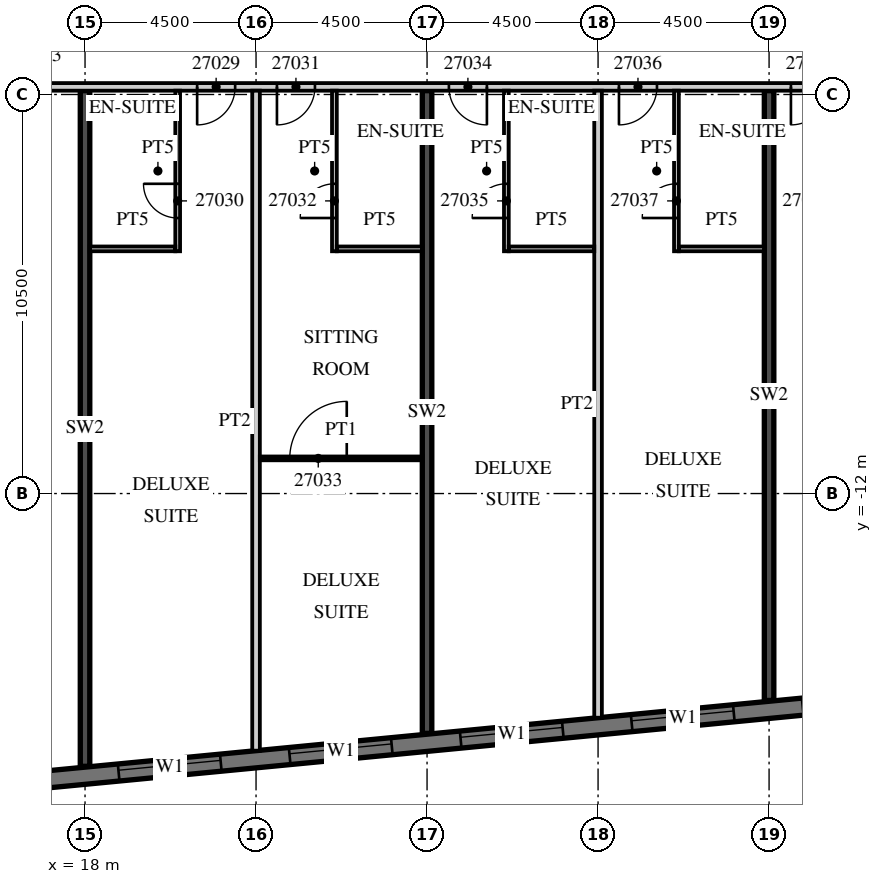
"""IFC4 building model, lengths in metres.
Left out: names, types, materials, properties, quantities, classifications, styles, units other than length and angle.
Written with IfcOpenShell. Run it as: python <this file> out.ifc"""

import sys

from ifc_helpers import new_model, si_unit, direction, frame, frame_2d, origin, place, context, subcontext, project, spatial, rectangle, extrude, element, fill, save


model = new_model("IFC4")
c1 = context("Model", 3, precision=1e-05, world=origin(), true_north=direction((0.0, 1.0)))
c2 = subcontext(c1, "Body", "Model", "MODEL_VIEW")
j1 = project(units=[si_unit("LENGTHUNIT", "METRE"), si_unit("PLANEANGLEUNIT", "RADIAN")], contexts=[c1])
p1 = place(None, origin())
s1 = spatial("IfcSite", under=j1, at=p1, CompositionType="ELEMENT")
p2 = place(p1, origin())
s2 = spatial("IfcBuilding", under=s1, at=p2, CompositionType="ELEMENT")
p3 = place(p2, frame((0.0, 0.0, 124.0)))
s3 = spatial("IfcBuildingStorey", under=s2, at=p3, CompositionType="ELEMENT", Elevation=124.0)
p4 = place(p3, frame((18.0, -19.177, 0.0), z_axis=(0.0, 0.0, 1.0), x_axis=(0.0, 1.0, 0.0)))
e1 = element("IfcWall", 1, at=p4, inside=s3, PredefinedType="SHEAR", context=c2, shape_type="SweptSolid", body=[
    extrude(rectangle(XDim=17.777, YDim=0.25, at=frame_2d((8.889, 0.0))), origin(), (0.0, 0.0, 1.0), 3.3),
])
p5 = place(p3, frame((27.0, -18.311, 0.0), z_axis=(0.0, 0.0, 1.0), x_axis=(0.0, 1.0, 0.0)))
e2 = element("IfcWall", 2, at=p5, inside=s3, PredefinedType="SHEAR", context=c2, shape_type="SweptSolid", body=[
    extrude(rectangle(XDim=16.911, YDim=0.25, at=frame_2d((8.455, 0.0))), origin(), (0.0, 0.0, 1.0), 3.3),
])
p6 = place(p3, frame((36.0, -17.444, 0.0), z_axis=(0.0, 0.0, 1.0), x_axis=(0.0, 1.0, 0.0)))
e3 = element("IfcWall", 3, at=p6, inside=s3, PredefinedType="SHEAR", context=c2, shape_type="SweptSolid", body=[
    extrude(rectangle(XDim=16.044, YDim=0.25, at=frame_2d((8.022, 0.0))), origin(), (0.0, 0.0, 1.0), 3.3),
])
p7 = place(p3, frame((-13.521, -22.46, 0.0), z_axis=(0.0, 0.0, 1.0), x_axis=(0.995396096335, 0.095846812164, 0.0)))
e4 = element("IfcWall", 4, at=p7, inside=s3, PredefinedType="SOLIDWALL", context=c2, shape_type="SweptSolid", body=[
    extrude(rectangle(XDim=59.151, YDim=0.45, at=frame_2d((29.575, 0.0))), origin(), (0.0, 0.0, 1.0), 3.02),
])
p8 = place(p7, frame((0.91, 0.0, 0.45)))
e5 = element("IfcOpeningElement", 5, at=p8, cuts=e4, PredefinedType="OPENING", context=c2, shape_type="SweptSolid", body=[
    extrude(rectangle(XDim=2.7, YDim=2.25, at=frame_2d((1.35, 1.125))), frame((0.0, 0.235, 0.0), z_axis=(0.0, -1.0, 0.0), x_axis=(1.0, 0.0, 0.0)), (0.0, 0.0, 1.0), 0.47),
])
p9 = place(p7, frame((5.431, 0.0, 0.45)))
e6 = element("IfcOpeningElement", 6, at=p9, cuts=e4, PredefinedType="OPENING", context=c2, shape_type="SweptSolid", body=[
    extrude(rectangle(XDim=2.7, YDim=2.25, at=frame_2d((1.35, 1.125))), frame((0.0, 0.235, 0.0), z_axis=(0.0, -1.0, 0.0), x_axis=(1.0, 0.0, 0.0)), (0.0, 0.0, 1.0), 0.47),
])
p10 = place(p7, frame((9.952, 0.0, 0.45)))
e7 = element("IfcOpeningElement", 7, at=p10, cuts=e4, PredefinedType="OPENING", context=c2, shape_type="SweptSolid", body=[
    extrude(rectangle(XDim=2.7, YDim=2.25, at=frame_2d((1.35, 1.125))), frame((0.0, 0.235, 0.0), z_axis=(0.0, -1.0, 0.0), x_axis=(1.0, 0.0, 0.0)), (0.0, 0.0, 1.0), 0.47),
])
p11 = place(p7, frame((14.473, 0.0, 0.45)))
e8 = element("IfcOpeningElement", 8, at=p11, cuts=e4, PredefinedType="OPENING", context=c2, shape_type="SweptSolid", body=[
    extrude(rectangle(XDim=2.7, YDim=2.25, at=frame_2d((1.35, 1.125))), frame((0.0, 0.235, 0.0), z_axis=(0.0, -1.0, 0.0), x_axis=(1.0, 0.0, 0.0)), (0.0, 0.0, 1.0), 0.47),
])
p12 = place(p7, frame((18.994, 0.0, 0.45)))
e9 = element("IfcOpeningElement", 9, at=p12, cuts=e4, PredefinedType="OPENING", context=c2, shape_type="SweptSolid", body=[
    extrude(rectangle(XDim=2.7, YDim=2.25, at=frame_2d((1.35, 1.125))), frame((0.0, 0.235, 0.0), z_axis=(0.0, -1.0, 0.0), x_axis=(1.0, 0.0, 0.0)), (0.0, 0.0, 1.0), 0.47),
])
p13 = place(p7, frame((23.514, 0.0, 0.45)))
e10 = element("IfcOpeningElement", 10, at=p13, cuts=e4, PredefinedType="OPENING", context=c2, shape_type="SweptSolid", body=[
    extrude(rectangle(XDim=2.7, YDim=2.25, at=frame_2d((1.35, 1.125))), frame((0.0, 0.235, 0.0), z_axis=(0.0, -1.0, 0.0), x_axis=(1.0, 0.0, 0.0)), (0.0, 0.0, 1.0), 0.47),
])
p14 = place(p7, frame((28.035, 0.0, 0.45)))
e11 = element("IfcOpeningElement", 11, at=p14, cuts=e4, PredefinedType="OPENING", context=c2, shape_type="SweptSolid", body=[
    extrude(rectangle(XDim=2.7, YDim=2.25, at=frame_2d((1.35, 1.125))), frame((0.0, 0.235, 0.0), z_axis=(0.0, -1.0, 0.0), x_axis=(1.0, 0.0, 0.0)), (0.0, 0.0, 1.0), 0.47),
])
p15 = place(p7, frame((32.556, 0.0, 0.45)))
e12 = element("IfcOpeningElement", 12, at=p15, cuts=e4, PredefinedType="OPENING", context=c2, shape_type="SweptSolid", body=[
    extrude(rectangle(XDim=2.7, YDim=2.25, at=frame_2d((1.35, 1.125))), frame((0.0, 0.235, 0.0), z_axis=(0.0, -1.0, 0.0), x_axis=(1.0, 0.0, 0.0)), (0.0, 0.0, 1.0), 0.47),
])
p16 = place(p7, frame((37.077, 0.0, 0.45)))
e13 = element("IfcOpeningElement", 13, at=p16, cuts=e4, PredefinedType="OPENING", context=c2, shape_type="SweptSolid", body=[
    extrude(rectangle(XDim=2.7, YDim=2.25, at=frame_2d((1.35, 1.125))), frame((0.0, 0.235, 0.0), z_axis=(0.0, -1.0, 0.0), x_axis=(1.0, 0.0, 0.0)), (0.0, 0.0, 1.0), 0.47),
])
p17 = place(p7, frame((41.598, 0.0, 0.45)))
e14 = element("IfcOpeningElement", 14, at=p17, cuts=e4, PredefinedType="OPENING", context=c2, shape_type="SweptSolid", body=[
    extrude(rectangle(XDim=2.7, YDim=2.25, at=frame_2d((1.35, 1.125))), frame((0.0, 0.235, 0.0), z_axis=(0.0, -1.0, 0.0), x_axis=(1.0, 0.0, 0.0)), (0.0, 0.0, 1.0), 0.47),
])
p18 = place(p7, frame((46.118, 0.0, 0.45)))
e15 = element("IfcOpeningElement", 15, at=p18, cuts=e4, PredefinedType="OPENING", context=c2, shape_type="SweptSolid", body=[
    extrude(rectangle(XDim=2.7, YDim=2.25, at=frame_2d((1.35, 1.125))), frame((0.0, 0.235, 0.0), z_axis=(0.0, -1.0, 0.0), x_axis=(1.0, 0.0, 0.0)), (0.0, 0.0, 1.0), 0.47),
])
p19 = place(p7, frame((50.639, 0.0, 0.45)))
e16 = element("IfcOpeningElement", 16, at=p19, cuts=e4, PredefinedType="OPENING", context=c2, shape_type="SweptSolid", body=[
    extrude(rectangle(XDim=2.7, YDim=2.25, at=frame_2d((1.35, 1.125))), frame((0.0, 0.235, 0.0), z_axis=(0.0, -1.0, 0.0), x_axis=(1.0, 0.0, 0.0)), (0.0, 0.0, 1.0), 0.47),
])
p20 = place(p7, frame((55.15, 0.0, 0.45)))
e17 = element("IfcOpeningElement", 17, at=p20, cuts=e4, PredefinedType="OPENING", context=c2, shape_type="SweptSolid", body=[
    extrude(rectangle(XDim=2.7, YDim=2.25, at=frame_2d((1.35, 1.125))), frame((0.0, 0.235, 0.0), z_axis=(0.0, -1.0, 0.0), x_axis=(1.0, 0.0, 0.0)), (0.0, 0.0, 1.0), 0.47),
])
p21 = place(p3, frame((-13.5, -1.3, 0.0), z_axis=(0.0, 0.0, 1.0), x_axis=(1.0, 0.0, 0.0)))
e18 = element("IfcWall", 18, at=p21, inside=s3, PredefinedType="PARTITIONING", context=c2, shape_type="SweptSolid", body=[
    extrude(rectangle(XDim=60.932, YDim=0.2, at=frame_2d((30.466, 0.0))), origin(), (0.0, 0.0, 1.0), 3.02),
])
p22 = place(p21, frame((2.925, 0.0, 0.0)))
e19 = element("IfcOpeningElement", 19, at=p22, cuts=e18, PredefinedType="OPENING", context=c2, shape_type="SweptSolid", body=[
    extrude(rectangle(XDim=1.0, YDim=2.1, at=frame_2d((0.5, 1.05))), frame((0.0, 0.11, 0.0), z_axis=(0.0, -1.0, 0.0), x_axis=(1.0, 0.0, 0.0)), (0.0, 0.0, 1.0), 0.22),
])
p23 = place(p21, frame((9.863, 0.0, 0.0)))
e20 = element("IfcOpeningElement", 20, at=p23, cuts=e18, PredefinedType="OPENING", context=c2, shape_type="SweptSolid", body=[
    extrude(rectangle(XDim=1.2, YDim=2.1, at=frame_2d((0.6, 1.05))), frame((0.0, 0.11, 0.0), z_axis=(0.0, -1.0, 0.0), x_axis=(1.0, 0.0, 0.0)), (0.0, 0.0, 1.0), 0.22),
])
p24 = place(p21, frame((15.938, 0.0, 0.0)))
e21 = element("IfcOpeningElement", 21, at=p24, cuts=e18, PredefinedType="OPENING", context=c2, shape_type="SweptSolid", body=[
    extrude(rectangle(XDim=1.2, YDim=2.1, at=frame_2d((0.6, 1.05))), frame((0.0, 0.11, 0.0), z_axis=(0.0, -1.0, 0.0), x_axis=(1.0, 0.0, 0.0)), (0.0, 0.0, 1.0), 0.22),
])
p25 = place(p21, frame((27.862, 0.0, 0.0)))
e22 = element("IfcOpeningElement", 22, at=p25, cuts=e18, PredefinedType="OPENING", context=c2, shape_type="SweptSolid", body=[
    extrude(rectangle(XDim=1.2, YDim=2.1, at=frame_2d((0.6, 1.05))), frame((0.0, 0.11, 0.0), z_axis=(0.0, -1.0, 0.0), x_axis=(1.0, 0.0, 0.0)), (0.0, 0.0, 1.0), 0.22),
])
p26 = place(p21, frame((34.45, 0.0, 0.0)))
e23 = element("IfcOpeningElement", 23, at=p26, cuts=e18, PredefinedType="OPENING", context=c2, shape_type="SweptSolid", body=[
    extrude(rectangle(XDim=1.0, YDim=2.1, at=frame_2d((0.5, 1.05))), frame((0.0, 0.11, 0.0), z_axis=(0.0, -1.0, 0.0), x_axis=(1.0, 0.0, 0.0)), (0.0, 0.0, 1.0), 0.22),
])
p27 = place(p21, frame((36.55, 0.0, 0.0)))
e24 = element("IfcOpeningElement", 24, at=p27, cuts=e18, PredefinedType="OPENING", context=c2, shape_type="SweptSolid", body=[
    extrude(rectangle(XDim=1.0, YDim=2.1, at=frame_2d((0.5, 1.05))), frame((0.0, 0.11, 0.0), z_axis=(0.0, -1.0, 0.0), x_axis=(1.0, 0.0, 0.0)), (0.0, 0.0, 1.0), 0.22),
])
p28 = place(p21, frame((41.075, 0.0, 0.0)))
e25 = element("IfcOpeningElement", 25, at=p28, cuts=e18, PredefinedType="OPENING", context=c2, shape_type="SweptSolid", body=[
    extrude(rectangle(XDim=1.0, YDim=2.1, at=frame_2d((0.5, 1.05))), frame((0.0, 0.11, 0.0), z_axis=(0.0, -1.0, 0.0), x_axis=(1.0, 0.0, 0.0)), (0.0, 0.0, 1.0), 0.22),
])
p29 = place(p21, frame((45.55, 0.0, 0.0)))
e26 = element("IfcOpeningElement", 26, at=p29, cuts=e18, PredefinedType="OPENING", context=c2, shape_type="SweptSolid", body=[
    extrude(rectangle(XDim=1.0, YDim=2.1, at=frame_2d((0.5, 1.05))), frame((0.0, 0.11, 0.0), z_axis=(0.0, -1.0, 0.0), x_axis=(1.0, 0.0, 0.0)), (0.0, 0.0, 1.0), 0.22),
])
p30 = place(p21, frame((50.075, 0.0, 0.0)))
e27 = element("IfcOpeningElement", 27, at=p30, cuts=e18, PredefinedType="OPENING", context=c2, shape_type="SweptSolid", body=[
    extrude(rectangle(XDim=1.0, YDim=2.1, at=frame_2d((0.5, 1.05))), frame((0.0, 0.11, 0.0), z_axis=(0.0, -1.0, 0.0), x_axis=(1.0, 0.0, 0.0)), (0.0, 0.0, 1.0), 0.22),
])
p31 = place(p21, frame((54.575, 0.0, 0.0)))
e28 = element("IfcOpeningElement", 28, at=p31, cuts=e18, PredefinedType="OPENING", context=c2, shape_type="SweptSolid", body=[
    extrude(rectangle(XDim=1.0, YDim=2.1, at=frame_2d((0.5, 1.05))), frame((0.0, 0.11, 0.0), z_axis=(0.0, -1.0, 0.0), x_axis=(1.0, 0.0, 0.0)), (0.0, 0.0, 1.0), 0.22),
])
p32 = place(p21, frame((59.882, 0.0, 0.0)))
e29 = element("IfcOpeningElement", 29, at=p32, cuts=e18, PredefinedType="OPENING", context=c2, shape_type="SweptSolid", body=[
    extrude(rectangle(XDim=0.9, YDim=2.1, at=frame_2d((0.45, 1.05))), frame((0.0, 0.11, 0.0), z_axis=(0.0, -1.0, 0.0), x_axis=(1.0, 0.0, 0.0)), (0.0, 0.0, 1.0), 0.22),
])
p33 = place(p3, frame((22.5, -18.766, 0.0), z_axis=(0.0, 0.0, 1.0), x_axis=(0.0, 1.0, 0.0)))
e30 = element("IfcWall", 30, at=p33, inside=s3, PredefinedType="PARTITIONING", context=c2, shape_type="SweptSolid", body=[
    extrude(rectangle(XDim=17.366, YDim=0.2, at=frame_2d((8.683, 0.0))), origin(), (0.0, 0.0, 1.0), 3.02),
])
p34 = place(p3, frame((20.438, -5.625, 0.0), z_axis=(0.0, 0.0, 1.0), x_axis=(0.0, 1.0, 0.0)))
e31 = element("IfcWall", 31, at=p34, inside=s3, PredefinedType="PARTITIONING", context=c2, shape_type="SweptSolid", body=[
    extrude(rectangle(XDim=4.225, YDim=0.125, at=frame_2d((2.113, 0.0))), origin(), (0.0, 0.0, 1.0), 3.02),
])
p35 = place(p34, frame((0.875, 0.0, 0.0)))
e32 = element("IfcOpeningElement", 32, at=p35, cuts=e31, PredefinedType="OPENING", context=c2, shape_type="SweptSolid", body=[
    extrude(rectangle(XDim=0.9, YDim=2.1, at=frame_2d((0.45, 1.05))), frame((0.0, 0.073, 0.0), z_axis=(0.0, -1.0, 0.0), x_axis=(1.0, 0.0, 0.0)), (0.0, 0.0, 1.0), 0.145),
])
p36 = place(p3, frame((18.125, -5.562, 0.0), z_axis=(0.0, 0.0, 1.0), x_axis=(1.0, 0.0, 0.0)))
e33 = element("IfcWall", 33, at=p36, inside=s3, PredefinedType="PARTITIONING", context=c2, shape_type="SweptSolid", body=[
    extrude(rectangle(XDim=2.25, YDim=0.125, at=frame_2d((1.125, 0.0))), origin(), (0.0, 0.0, 1.0), 3.02),
])
p37 = place(p3, frame((24.562, -5.625, 0.0), z_axis=(0.0, 0.0, 1.0), x_axis=(0.0, 1.0, 0.0)))
e34 = element("IfcWall", 34, at=p37, inside=s3, PredefinedType="PARTITIONING", context=c2, shape_type="SweptSolid", body=[
    extrude(rectangle(XDim=4.225, YDim=0.125, at=frame_2d((2.113, 0.0))), origin(), (0.0, 0.0, 1.0), 3.02),
])
p38 = place(p37, frame((0.875, 0.0, 0.0)))
e35 = element("IfcOpeningElement", 35, at=p38, cuts=e34, PredefinedType="OPENING", context=c2, shape_type="SweptSolid", body=[
    extrude(rectangle(XDim=0.9, YDim=2.1, at=frame_2d((0.45, 1.05))), frame((0.0, 0.073, 0.0), z_axis=(0.0, -1.0, 0.0), x_axis=(1.0, 0.0, 0.0)), (0.0, 0.0, 1.0), 0.145),
])
p39 = place(p3, frame((24.625, -5.562, 0.0), z_axis=(0.0, 0.0, 1.0), x_axis=(1.0, 0.0, 0.0)))
e36 = element("IfcWall", 36, at=p39, inside=s3, PredefinedType="PARTITIONING", context=c2, shape_type="SweptSolid", body=[
    extrude(rectangle(XDim=2.25, YDim=0.125, at=frame_2d((1.125, 0.0))), origin(), (0.0, 0.0, 1.0), 3.02),
])
p40 = place(p3, frame((22.6, -11.075, 0.0), z_axis=(0.0, 0.0, 1.0), x_axis=(1.0, 0.0, 0.0)))
e37 = element("IfcWall", 37, at=p40, inside=s3, PredefinedType="PARTITIONING", context=c2, shape_type="SweptSolid", body=[
    extrude(rectangle(XDim=4.275, YDim=0.1, at=frame_2d((2.137, 0.0))), origin(), (0.0, 0.0, 1.0), 3.02),
])
p41 = place(p40, frame((0.787, 0.0, 0.0)))
e38 = element("IfcOpeningElement", 38, at=p41, cuts=e37, PredefinedType="OPENING", context=c2, shape_type="SweptSolid", body=[
    extrude(rectangle(XDim=1.5, YDim=2.1, at=frame_2d((0.75, 1.05))), frame((0.0, 0.06, 0.0), z_axis=(0.0, -1.0, 0.0), x_axis=(1.0, 0.0, 0.0)), (0.0, 0.0, 1.0), 0.12),
])
p42 = place(p3, frame((31.5, -17.899, 0.0), z_axis=(0.0, 0.0, 1.0), x_axis=(0.0, 1.0, 0.0)))
e39 = element("IfcWall", 39, at=p42, inside=s3, PredefinedType="PARTITIONING", context=c2, shape_type="SweptSolid", body=[
    extrude(rectangle(XDim=16.499, YDim=0.2, at=frame_2d((8.25, 0.0))), origin(), (0.0, 0.0, 1.0), 3.02),
])
p43 = place(p3, frame((29.087, -5.625, 0.0), z_axis=(0.0, 0.0, 1.0), x_axis=(0.0, 1.0, 0.0)))
e40 = element("IfcWall", 40, at=p43, inside=s3, PredefinedType="PARTITIONING", context=c2, shape_type="SweptSolid", body=[
    extrude(rectangle(XDim=4.225, YDim=0.125, at=frame_2d((2.113, 0.0))), origin(), (0.0, 0.0, 1.0), 3.02),
])
p44 = place(p43, frame((0.875, 0.0, 0.0)))
e41 = element("IfcOpeningElement", 41, at=p44, cuts=e40, PredefinedType="OPENING", context=c2, shape_type="SweptSolid", body=[
    extrude(rectangle(XDim=0.9, YDim=2.1, at=frame_2d((0.45, 1.05))), frame((0.0, 0.073, 0.0), z_axis=(0.0, -1.0, 0.0), x_axis=(1.0, 0.0, 0.0)), (0.0, 0.0, 1.0), 0.145),
])
p45 = place(p3, frame((29.15, -5.562, 0.0), z_axis=(0.0, 0.0, 1.0), x_axis=(1.0, 0.0, 0.0)))
e42 = element("IfcWall", 42, at=p45, inside=s3, PredefinedType="PARTITIONING", context=c2, shape_type="SweptSolid", body=[
    extrude(rectangle(XDim=2.25, YDim=0.125, at=frame_2d((1.125, 0.0))), origin(), (0.0, 0.0, 1.0), 3.02),
])
p46 = place(p3, frame((33.562, -5.625, 0.0), z_axis=(0.0, 0.0, 1.0), x_axis=(0.0, 1.0, 0.0)))
e43 = element("IfcWall", 43, at=p46, inside=s3, PredefinedType="PARTITIONING", context=c2, shape_type="SweptSolid", body=[
    extrude(rectangle(XDim=4.225, YDim=0.125, at=frame_2d((2.113, 0.0))), origin(), (0.0, 0.0, 1.0), 3.02),
])
p47 = place(p46, frame((0.875, 0.0, 0.0)))
e44 = element("IfcOpeningElement", 44, at=p47, cuts=e43, PredefinedType="OPENING", context=c2, shape_type="SweptSolid", body=[
    extrude(rectangle(XDim=0.9, YDim=2.1, at=frame_2d((0.45, 1.05))), frame((0.0, 0.073, 0.0), z_axis=(0.0, -1.0, 0.0), x_axis=(1.0, 0.0, 0.0)), (0.0, 0.0, 1.0), 0.145),
])
p48 = place(p3, frame((33.625, -5.562, 0.0), z_axis=(0.0, 0.0, 1.0), x_axis=(1.0, 0.0, 0.0)))
e45 = element("IfcWall", 45, at=p48, inside=s3, PredefinedType="PARTITIONING", context=c2, shape_type="SweptSolid", body=[
    extrude(rectangle(XDim=2.25, YDim=0.125, at=frame_2d((1.125, 0.0))), origin(), (0.0, 0.0, 1.0), 3.02),
])
p49 = place(p15, origin())
e46 = element("IfcWindow", 46, at=p49, inside=s3, PartitioningType="SINGLE_PANEL", PredefinedType="WINDOW", context=c2, shape_type="SweptSolid", body=[
    extrude(rectangle(XDim=2.7, YDim=2.25, at=frame_2d((1.35, 1.125))), frame((0.0, 0.09, 0.0), z_axis=(0.0, -1.0, 0.0), x_axis=(1.0, 0.0, 0.0)), (0.0, 0.0, 1.0), 0.06),
])
fill(e12, e46)
p50 = place(p16, origin())
e47 = element("IfcWindow", 47, at=p50, inside=s3, PartitioningType="SINGLE_PANEL", PredefinedType="WINDOW", context=c2, shape_type="SweptSolid", body=[
    extrude(rectangle(XDim=2.7, YDim=2.25, at=frame_2d((1.35, 1.125))), frame((0.0, 0.09, 0.0), z_axis=(0.0, -1.0, 0.0), x_axis=(1.0, 0.0, 0.0)), (0.0, 0.0, 1.0), 0.06),
])
fill(e13, e47)
p51 = place(p17, origin())
e48 = element("IfcWindow", 48, at=p51, inside=s3, PartitioningType="SINGLE_PANEL", PredefinedType="WINDOW", context=c2, shape_type="SweptSolid", body=[
    extrude(rectangle(XDim=2.7, YDim=2.25, at=frame_2d((1.35, 1.125))), frame((0.0, 0.09, 0.0), z_axis=(0.0, -1.0, 0.0), x_axis=(1.0, 0.0, 0.0)), (0.0, 0.0, 1.0), 0.06),
])
fill(e14, e48)
p52 = place(p18, origin())
e49 = element("IfcWindow", 49, at=p52, inside=s3, PartitioningType="SINGLE_PANEL", PredefinedType="WINDOW", context=c2, shape_type="SweptSolid", body=[
    extrude(rectangle(XDim=2.7, YDim=2.25, at=frame_2d((1.35, 1.125))), frame((0.0, 0.09, 0.0), z_axis=(0.0, -1.0, 0.0), x_axis=(1.0, 0.0, 0.0)), (0.0, 0.0, 1.0), 0.06),
])
fill(e15, e49)
p53 = place(p26, origin())
e50 = element("IfcDoor", 50, at=p53, inside=s3, OperationType="SINGLE_SWING_LEFT", PredefinedType="DOOR", context=c2, shape_type="SweptSolid", body=[
    extrude(rectangle(XDim=1.0, YDim=2.1, at=frame_2d((0.5, 1.05))), frame((0.0, 0.025, 0.0), z_axis=(0.0, -1.0, 0.0), x_axis=(1.0, 0.0, 0.0)), (0.0, 0.0, 1.0), 0.05),
])
fill(e23, e50)
p54 = place(p35, origin())
e51 = element("IfcDoor", 51, at=p54, inside=s3, OperationType="SINGLE_SWING_RIGHT", PredefinedType="DOOR", context=c2, shape_type="SweptSolid", body=[
    extrude(rectangle(XDim=0.9, YDim=2.1, at=frame_2d((0.45, 1.05))), frame((0.0, 0.025, 0.0), z_axis=(0.0, -1.0, 0.0), x_axis=(1.0, 0.0, 0.0)), (0.0, 0.0, 1.0), 0.05),
])
fill(e32, e51)
p55 = place(p27, origin())
e52 = element("IfcDoor", 52, at=p55, inside=s3, OperationType="SINGLE_SWING_LEFT", PredefinedType="DOOR", context=c2, shape_type="SweptSolid", body=[
    extrude(rectangle(XDim=1.0, YDim=2.1, at=frame_2d((0.5, 1.05))), frame((0.0, 0.025, 0.0), z_axis=(0.0, -1.0, 0.0), x_axis=(1.0, 0.0, 0.0)), (0.0, 0.0, 1.0), 0.05),
])
fill(e24, e52)
p56 = place(p38, origin())
e53 = element("IfcDoor", 53, at=p56, inside=s3, OperationType="SINGLE_SWING_LEFT", PredefinedType="DOOR", context=c2, shape_type="SweptSolid", body=[
    extrude(rectangle(XDim=0.9, YDim=2.1, at=frame_2d((0.45, 1.05))), frame((0.0, 0.025, 0.0), z_axis=(0.0, -1.0, 0.0), x_axis=(1.0, 0.0, 0.0)), (0.0, 0.0, 1.0), 0.05),
])
fill(e35, e53)
p57 = place(p41, origin())
e54 = element("IfcDoor", 54, at=p57, inside=s3, OperationType="SINGLE_SWING_RIGHT", PredefinedType="DOOR", context=c2, shape_type="SweptSolid", body=[
    extrude(rectangle(XDim=1.5, YDim=2.1, at=frame_2d((0.75, 1.05))), frame((0.0, 0.025, 0.0), z_axis=(0.0, -1.0, 0.0), x_axis=(1.0, 0.0, 0.0)), (0.0, 0.0, 1.0), 0.05),
])
fill(e38, e54)
p58 = place(p28, origin())
e55 = element("IfcDoor", 55, at=p58, inside=s3, OperationType="SINGLE_SWING_RIGHT", PredefinedType="DOOR", context=c2, shape_type="SweptSolid", body=[
    extrude(rectangle(XDim=1.0, YDim=2.1, at=frame_2d((0.5, 1.05))), frame((0.0, 0.025, 0.0), z_axis=(0.0, -1.0, 0.0), x_axis=(1.0, 0.0, 0.0)), (0.0, 0.0, 1.0), 0.05),
])
fill(e25, e55)
p59 = place(p44, origin())
e56 = element("IfcDoor", 56, at=p59, inside=s3, OperationType="SINGLE_SWING_LEFT", PredefinedType="DOOR", context=c2, shape_type="SweptSolid", body=[
    extrude(rectangle(XDim=0.9, YDim=2.1, at=frame_2d((0.45, 1.05))), frame((0.0, 0.025, 0.0), z_axis=(0.0, -1.0, 0.0), x_axis=(1.0, 0.0, 0.0)), (0.0, 0.0, 1.0), 0.05),
])
fill(e41, e56)
p60 = place(p29, origin())
e57 = element("IfcDoor", 57, at=p60, inside=s3, OperationType="SINGLE_SWING_LEFT", PredefinedType="DOOR", context=c2, shape_type="SweptSolid", body=[
    extrude(rectangle(XDim=1.0, YDim=2.1, at=frame_2d((0.5, 1.05))), frame((0.0, 0.025, 0.0), z_axis=(0.0, -1.0, 0.0), x_axis=(1.0, 0.0, 0.0)), (0.0, 0.0, 1.0), 0.05),
])
fill(e26, e57)
p61 = place(p47, origin())
e58 = element("IfcDoor", 58, at=p61, inside=s3, OperationType="SINGLE_SWING_LEFT", PredefinedType="DOOR", context=c2, shape_type="SweptSolid", body=[
    extrude(rectangle(XDim=0.9, YDim=2.1, at=frame_2d((0.45, 1.05))), frame((0.0, 0.025, 0.0), z_axis=(0.0, -1.0, 0.0), x_axis=(1.0, 0.0, 0.0)), (0.0, 0.0, 1.0), 0.05),
])
fill(e44, e58)
p62 = place(p30, origin())
e59 = element("IfcDoor", 59, at=p62, inside=s3, OperationType="SINGLE_SWING_LEFT", PredefinedType="DOOR", context=c2, shape_type="SweptSolid", body=[
    extrude(rectangle(XDim=1.0, YDim=2.1, at=frame_2d((0.5, 1.05))), frame((0.0, 0.025, 0.0), z_axis=(0.0, -1.0, 0.0), x_axis=(1.0, 0.0, 0.0)), (0.0, 0.0, 1.0), 0.05),
])
fill(e27, e59)
save(model, sys.argv[1])
